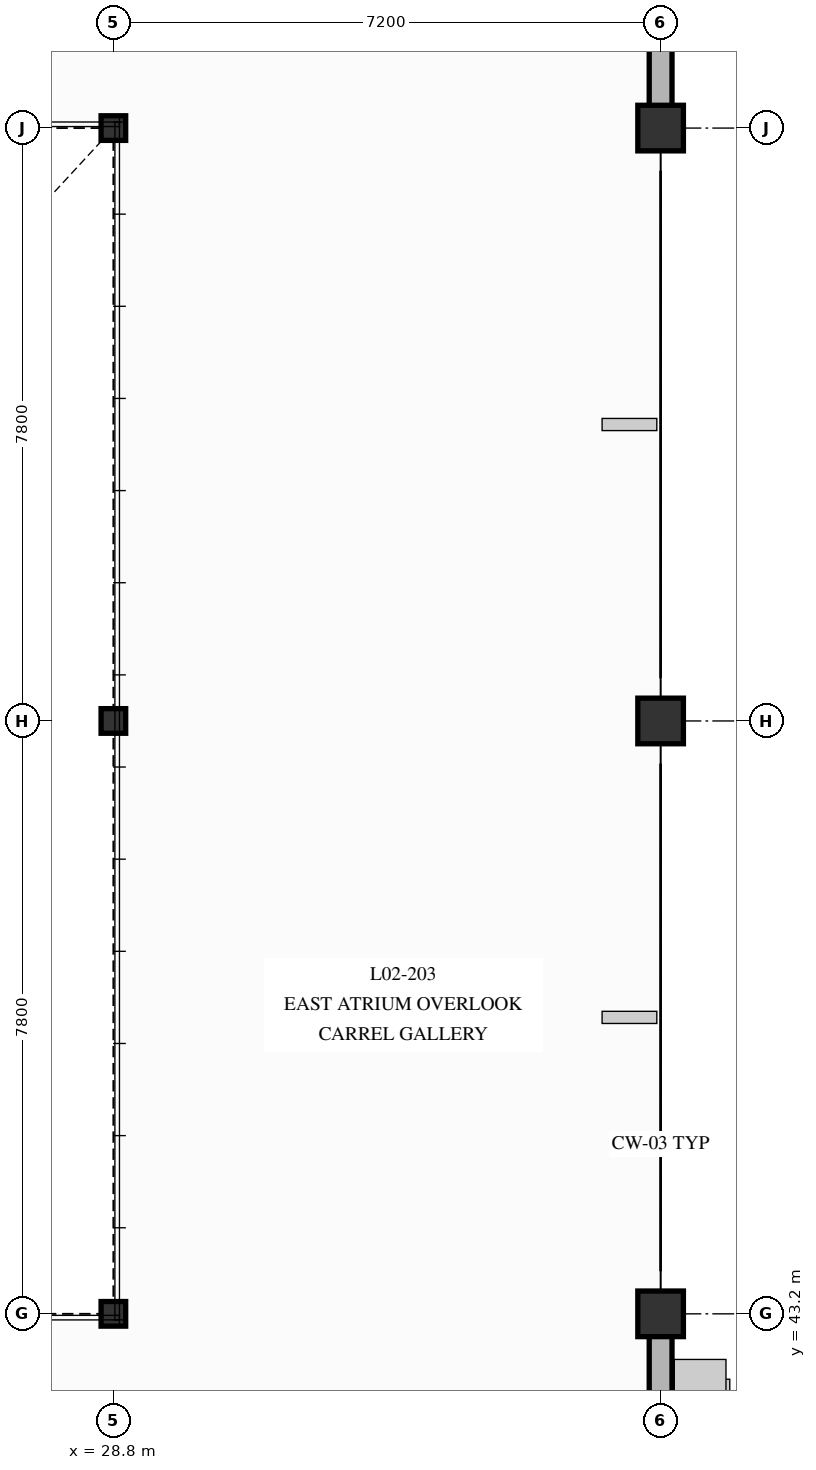
"""IFC4 building model, lengths in metres.
Left out: names, types, materials, properties, quantities, classifications, styles, units other than length and angle.
Written with IfcOpenShell. Run it as: python <this file> out.ifc"""

import sys

from ifc_helpers import new_model, si_unit, direction, frame, frame_2d, origin, origin_2d, place, context, subcontext, project, spatial, rectangle, hollow_circle, extrude, element, save


model = new_model("IFC4")
c1 = context("Model", 3, precision=1e-05, world=origin(), true_north=direction((0.0, 1.0)))
c2 = subcontext(c1, "Body", "Model", "MODEL_VIEW")
j1 = project(units=[si_unit("LENGTHUNIT", "METRE"), si_unit("PLANEANGLEUNIT", "RADIAN")], contexts=[c1])
p1 = place(None, origin())
s1 = spatial("IfcSite", under=j1, at=p1, CompositionType="ELEMENT")
p2 = place(p1, origin())
s2 = spatial("IfcBuilding", under=s1, at=p2, CompositionType="ELEMENT")
p3 = place(p2, frame((0.0, 0.0, 8.94)))
s3 = spatial("IfcBuildingStorey", under=s2, at=p3, CompositionType="ELEMENT", Elevation=8.94)
for number, where, z_axis, x_axis in (
    (1, (28.8, 43.2, 0.0), (0.0, 0.0, 1.0), (1.0, 0.0, 0.0)),
    (2, (28.8, 51.0, 0.0), (0.0, 0.0, 1.0), (1.0, 0.0, 0.0)),
    (3, (28.8, 58.8, 0.0), (0.0, 0.0, 1.0), (1.0, 0.0, 0.0)),
):
    element("IfcColumn", number, at=place(p3, frame(where, z_axis=z_axis, x_axis=x_axis)), inside=s3, PredefinedType="COLUMN", context=c2, shape_type="SweptSolid", body=[
        extrude(hollow_circle(Radius=0.162, WallThickness=0.012, at=origin_2d()), origin(), (0.0, 0.0, 1.0), 3.84),
    ])
for number, where, z_axis, x_axis in (
    (4, (36.0, 43.2, 0.0), (0.0, 0.0, 1.0), (1.0, 0.0, 0.0)),
    (5, (36.0, 51.0, 0.0), (0.0, 0.0, 1.0), (1.0, 0.0, 0.0)),
    (6, (36.0, 58.8, 0.0), (0.0, 0.0, 1.0), (1.0, 0.0, 0.0)),
):
    element("IfcColumn", number, at=place(p3, frame(where, z_axis=z_axis, x_axis=x_axis)), inside=s3, PredefinedType="COLUMN", context=c2, shape_type="SweptSolid", body=[
        extrude(rectangle(XDim=0.6, YDim=0.6, at=origin_2d()), origin(), (0.0, 0.0, 1.0), 3.84),
    ])
p4 = place(p3, frame((36.0, 36.0, 0.0), z_axis=(0.0, 0.0, 1.0), x_axis=(0.0, 1.0, 0.0)))
e7 = element("IfcWall", 7, at=p4, inside=s3, PredefinedType="SOLIDWALL", context=c2, shape_type="SweptSolid", body=[
    extrude(rectangle(XDim=7.2, YDim=0.3, at=frame_2d((3.6, 0.0))), origin(), (0.0, 0.0, 1.0), 3.53),
])
p5 = place(p4, frame((1.6, 0.0, 0.85)))
e8 = element("IfcOpeningElement", 8, at=p5, cuts=e7, PredefinedType="OPENING", context=c2, shape_type="SweptSolid", body=[
    extrude(rectangle(XDim=1.95, YDim=2.1, at=frame_2d((0.975, 1.05))), frame((0.0, 0.16, 0.0), z_axis=(0.0, -1.0, 0.0), x_axis=(1.0, 0.0, 0.0)), (0.0, 0.0, 1.0), 0.32),
])
p6 = place(p4, frame((4.5, 0.0, 0.85)))
e9 = element("IfcOpeningElement", 9, at=p6, cuts=e7, PredefinedType="OPENING", context=c2, shape_type="SweptSolid", body=[
    extrude(rectangle(XDim=1.6, YDim=2.05, at=frame_2d((0.8, 1.025))), frame((0.0, 0.16, 0.0), z_axis=(0.0, -1.0, 0.0), x_axis=(1.0, 0.0, 0.0)), (0.0, 0.0, 1.0), 0.32),
])
p7 = place(p3, frame((36.0, 58.8, 0.0), z_axis=(0.0, 0.0, 1.0), x_axis=(0.0, 1.0, 0.0)))
e10 = element("IfcWall", 10, at=p7, inside=s3, PredefinedType="SOLIDWALL", context=c2, shape_type="SweptSolid", body=[
    extrude(rectangle(XDim=7.8, YDim=0.3, at=frame_2d((3.9, 0.0))), origin(), (0.0, 0.0, 1.0), 3.118),
])
p8 = place(p7, frame((1.6, 0.0, 0.85)))
e11 = element("IfcOpeningElement", 11, at=p8, cuts=e10, PredefinedType="OPENING", context=c2, shape_type="SweptSolid", body=[
    extrude(rectangle(XDim=1.95, YDim=2.1, at=frame_2d((0.975, 1.05))), frame((0.0, 0.16, 0.0), z_axis=(0.0, -1.0, 0.0), x_axis=(1.0, 0.0, 0.0)), (0.0, 0.0, 1.0), 0.32),
])
p9 = place(p7, frame((4.5, 0.0, 0.85)))
e12 = element("IfcOpeningElement", 12, at=p9, cuts=e10, PredefinedType="OPENING", context=c2, shape_type="SweptSolid", body=[
    extrude(rectangle(XDim=1.6, YDim=2.05, at=frame_2d((0.8, 1.025))), frame((0.0, 0.16, 0.0), z_axis=(0.0, -1.0, 0.0), x_axis=(1.0, 0.0, 0.0)), (0.0, 0.0, 1.0), 0.32),
])
save(model, sys.argv[1])
